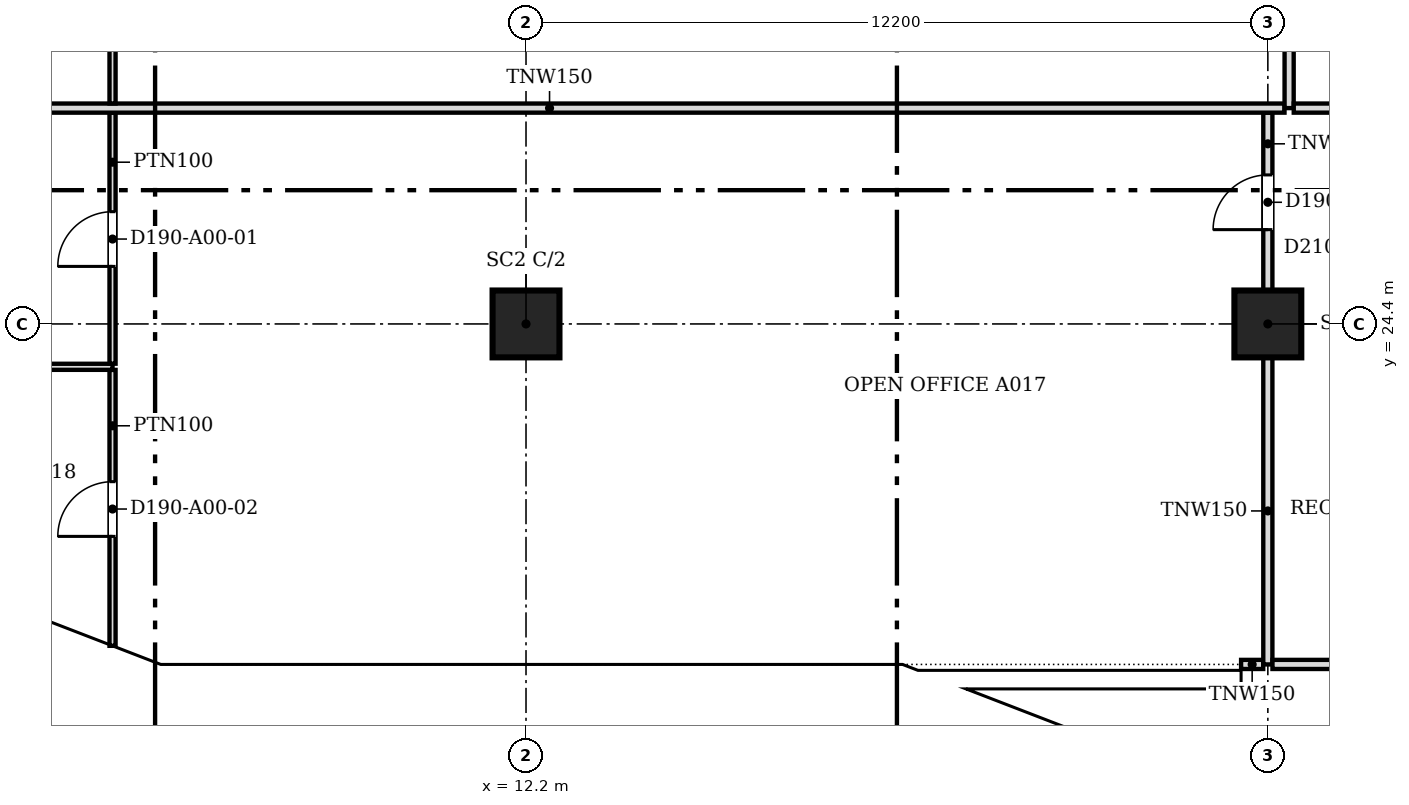
"""IFC4 building model, lengths in metres.
Left out: names, types, materials, properties, quantities, classifications, styles, units other than length and angle.
Written with IfcOpenShell. Run it as: python <this file> out.ifc"""

import sys

from ifc_helpers import new_model, si_unit, direction, frame, frame_2d, origin, origin_2d, place, context, subcontext, project, spatial, polyline, rectangle, outline, extrude, faceted_brep, source, transform, mapped, element, fill, save


model = new_model("IFC4")
c1 = context("Model", 3, precision=1e-05, world=origin(), true_north=direction((0.0, 1.0)))
c2 = subcontext(c1, "Body", "Model", "MODEL_VIEW")
j1 = project(units=[si_unit("LENGTHUNIT", "METRE"), si_unit("PLANEANGLEUNIT", "RADIAN")], contexts=[c1])
p1 = place(None, origin())
s1 = spatial("IfcSite", under=j1, at=p1, CompositionType="ELEMENT")
p2 = place(p1, origin())
s2 = spatial("IfcBuilding", under=s1, at=p2, CompositionType="ELEMENT")
p3 = place(p2, frame((0.0, 0.0, 16.8)))
s3 = spatial("IfcBuildingStorey", under=s2, at=p3, CompositionType="ELEMENT", Elevation=16.8)
for number, where, z_axis, x_axis in (
    (1, (12.2, 24.4, 0.0), (0.0, 0.0, 1.0), (1.0, 0.0, 0.0)),
    (2, (24.4, 24.4, 0.0), (0.0, 0.0, 1.0), (1.0, 0.0, 0.0)),
):
    element("IfcColumn", number, at=place(p3, frame(where, z_axis=z_axis, x_axis=x_axis)), inside=s3, PredefinedType="COLUMN", context=c2, shape_type="SweptSolid", body=[
        extrude(rectangle(XDim=1.1, YDim=1.1, at=origin_2d()), origin(), (0.0, 0.0, 1.0), 4.3),
    ])
m1 = source(origin(), c2, "Body", "Brep", [
    faceted_brep([(2.997, -0.25, 4.43), (2.95, -0.25, 4.5), (0.0, -0.25, 0.0), (2.997, -0.25, 0.0), (0.053, 0.25, 0.081), (2.904, 0.25, 4.429), (2.904, 0.25, 0.0), (0.053, 0.25, 0.0), (2.95, 0.0, 4.5), (0.0, 0.0, 0.0)], [[[0, 1, 2, 3]], [[4, 5, 6, 7]], [[8, 1, 0]], [[5, 4, 9, 2, 1, 8]], [[7, 6, 3, 2, 9]], [[7, 9, 4]], [[3, 6, 5, 8, 0]]]),
])
p4 = place(p3, frame((3.394, 19.612, 0.0), z_axis=(0.0, 0.0, 1.0), x_axis=(0.932990326376, -0.359901446078, 0.0)))
e3 = element("IfcWall", 3, at=p4, inside=s3, PredefinedType="SOLIDWALL", context=c2, shape_type="MappedRepresentation", body=[
    mapped(m1, transform((0.0, 0.0, 0.0), scale=1.0)),
])
m2 = source(origin(), c2, "Body", "SweptSolid", [
    extrude(outline(polyline([(2.75, 3.739), (0.463, 0.25), (2.75, 0.25), (2.75, 3.739)])), frame((0.0, 0.26, 0.0), z_axis=(0.0, -1.0, 0.0), x_axis=(1.0, 0.0, 0.0)), (0.0, 0.0, 1.0), 0.52),
])
p5 = place(p4, origin())
e4 = element("IfcOpeningElement", 4, at=p5, cuts=e3, PredefinedType="OPENING", context=c2, shape_type="MappedRepresentation", body=[
    mapped(m2, transform((0.0, 0.0, 0.0), scale=1.0)),
])
m3 = source(origin(), c2, "Body", "Brep", [
    faceted_brep([(3.05, -0.25, 0.0), (0.047, -0.25, 4.5), (0.0, -0.25, 4.429), (0.0, -0.25, 0.0), (0.093, 0.25, 4.43), (3.05, 0.25, 0.0), (0.093, 0.25, 0.0), (0.047, 0.0, 4.5)], [[[0, 1, 2, 3]], [[4, 5, 6]], [[5, 4, 7, 1, 0]], [[2, 1, 7]], [[6, 5, 0, 3]], [[6, 3, 2, 7, 4]]]),
])
p6 = place(p3, frame((6.1, 18.55, 0.0), z_axis=(0.0, 0.0, 1.0), x_axis=(1.0, 0.0, 0.0)))
e5 = element("IfcWall", 5, at=p6, inside=s3, PredefinedType="SOLIDWALL", context=c2, shape_type="MappedRepresentation", body=[
    mapped(m3, transform((0.0, 0.0, 0.0), scale=1.0)),
])
m4 = source(origin(), c2, "Body", "SweptSolid", [
    extrude(outline(polyline([(2.583, 0.25), (0.247, 3.75), (0.247, 0.25), (2.583, 0.25)])), frame((0.0, 0.26, 0.0), z_axis=(0.0, -1.0, 0.0), x_axis=(1.0, 0.0, 0.0)), (0.0, 0.0, 1.0), 0.52),
])
p7 = place(p6, origin())
e6 = element("IfcOpeningElement", 6, at=p7, cuts=e5, PredefinedType="OPENING", context=c2, shape_type="MappedRepresentation", body=[
    mapped(m4, transform((0.0, 0.0, 0.0), scale=1.0)),
])
m5 = source(origin(), c2, "Body", "SweptSolid", [
    extrude(outline(polyline([(6.1, 0.0), (3.05, 4.5), (0.0, 0.0), (6.1, 0.0)])), frame((0.0, 0.25, 0.0), z_axis=(0.0, -1.0, 0.0), x_axis=(1.0, 0.0, 0.0)), (0.0, 0.0, 1.0), 0.5),
])
p8 = place(p3, frame((9.15, 18.55, 0.0), z_axis=(0.0, 0.0, 1.0), x_axis=(1.0, 0.0, 0.0)))
e7 = element("IfcWall", 7, at=p8, inside=s3, PredefinedType="SOLIDWALL", context=c2, shape_type="MappedRepresentation", body=[
    mapped(m5, transform((0.0, 0.0, 0.0), scale=1.0)),
])
m6 = source(origin(), c2, "Body", "SweptSolid", [
    extrude(outline(polyline([(5.629, 0.25), (3.05, 4.054), (0.471, 0.25), (5.629, 0.25)])), frame((0.0, 0.26, 0.0), z_axis=(0.0, -1.0, 0.0), x_axis=(1.0, 0.0, 0.0)), (0.0, 0.0, 1.0), 0.52),
])
p9 = place(p8, origin())
e8 = element("IfcOpeningElement", 8, at=p9, cuts=e7, PredefinedType="OPENING", context=c2, shape_type="MappedRepresentation", body=[
    mapped(m6, transform((0.0, 0.0, 0.0), scale=1.0)),
])
m7 = source(origin(), c2, "Body", "Brep", [
    faceted_brep([(3.05, -0.25, 4.433), (0.0, -0.25, 0.0), (3.05, -0.25, 0.0), (0.0, 0.25, 0.0), (3.096, 0.25, 4.5), (3.143, 0.25, 4.433), (3.143, 0.25, 0.0), (3.096, -0.0, 4.5)], [[[0, 1, 2]], [[3, 4, 5, 6]], [[5, 4, 7]], [[4, 3, 1, 0, 7]], [[3, 6, 2, 1]], [[2, 6, 5, 7, 0]]]),
])
p10 = place(p3, frame((15.25, 18.55, 0.0), z_axis=(0.0, 0.0, 1.0), x_axis=(1.0, 0.0, 0.0)))
e9 = element("IfcWall", 9, at=p10, inside=s3, PredefinedType="SOLIDWALL", context=c2, shape_type="MappedRepresentation", body=[
    mapped(m7, transform((0.0, 0.0, 0.0), scale=1.0)),
])
m8 = source(origin(), c2, "Body", "SweptSolid", [
    extrude(outline(polyline([(2.896, 3.768), (0.476, 0.25), (2.896, 0.25), (2.896, 3.768)])), frame((0.0, 0.26, 0.0), z_axis=(0.0, -1.0, 0.0), x_axis=(1.0, 0.0, 0.0)), (0.0, 0.0, 1.0), 0.52),
])
p11 = place(p10, origin())
e10 = element("IfcOpeningElement", 10, at=p11, cuts=e9, PredefinedType="OPENING", context=c2, shape_type="MappedRepresentation", body=[
    mapped(m8, transform((0.0, 0.0, 0.0), scale=1.0)),
])
m9 = source(origin(), c2, "Body", "Brep", [
    faceted_brep([(3.143, -0.25, 0.075), (0.093, -0.25, 4.434), (0.093, -0.25, 0.0), (3.143, -0.25, 0.0), (0.0, 0.25, 4.432), (0.047, 0.25, 4.5), (3.196, 0.25, 0.0), (0.0, 0.25, 0.0), (0.047, 0.0, 4.5), (3.196, -0.0, 0.0)], [[[0, 1, 2, 3]], [[4, 5, 6, 7]], [[6, 5, 8, 1, 0, 9]], [[5, 4, 8]], [[7, 6, 9, 3, 2]], [[7, 2, 1, 8, 4]], [[3, 9, 0]]]),
])
p12 = place(p3, frame((18.303, 18.567, 0.0), z_axis=(0.0, 0.0, 1.0), x_axis=(0.932978940178, -0.359930961693, 0.0)))
e11 = element("IfcWall", 11, at=p12, inside=s3, PredefinedType="SOLIDWALL", context=c2, shape_type="MappedRepresentation", body=[
    mapped(m9, transform((0.0, 0.0, 0.0), scale=1.0)),
])
m10 = source(origin(), c2, "Body", "SweptSolid", [
    extrude(outline(polyline([(2.716, 0.25), (0.247, 3.778), (0.247, 0.25), (2.716, 0.25)])), frame((0.0, 0.26, 0.0), z_axis=(0.0, -1.0, 0.0), x_axis=(1.0, 0.0, 0.0)), (0.0, 0.0, 1.0), 0.52),
])
p13 = place(p12, origin())
e12 = element("IfcOpeningElement", 12, at=p13, cuts=e11, PredefinedType="OPENING", context=c2, shape_type="MappedRepresentation", body=[
    mapped(m10, transform((0.0, 0.0, 0.0), scale=1.0)),
])
p14 = place(p2, frame((0.0, 0.0, 21.3)))
s4 = spatial("IfcBuildingStorey", under=s2, at=p14, CompositionType="ELEMENT", Elevation=21.3)
m11 = source(origin(), c2, "Body", "Brep", [
    faceted_brep([(0.053, -0.25, 0.0), (3.003, -0.25, 4.5), (0.053, -0.25, 9.0), (0.0, -0.25, 8.919), (0.0, -0.25, 0.081), (0.106, 0.25, 8.919), (2.957, 0.25, 4.571), (2.957, 0.25, 4.429), (0.106, 0.25, 0.081), (3.003, 0.0, 4.5), (0.053, 0.0, 0.0), (0.053, 0.0, 9.0)], [[[0, 1, 2, 3, 4]], [[5, 6, 7, 8]], [[8, 7, 9, 1, 0, 10]], [[6, 5, 11, 2, 1, 9]], [[3, 2, 11]], [[10, 0, 4]], [[8, 10, 4, 3, 11, 5]], [[9, 7, 6]]]),
])
p15 = place(p14, frame((3.344, 19.631, -4.5), z_axis=(0.0, 0.0, 1.0), x_axis=(0.933007896601, -0.359855894603, 0.0)))
e13 = element("IfcWall", 13, at=p15, inside=s4, PredefinedType="SOLIDWALL", context=c2, shape_type="MappedRepresentation", body=[
    mapped(m11, transform((0.0, 0.0, 0.0), scale=1.0)),
])
m12 = source(origin(), c2, "Body", "SweptSolid", [
    extrude(outline(polyline([(0.253, 0.761), (2.705, 4.5), (0.253, 8.239), (0.253, 0.761)])), frame((0.0, 0.26, 0.0), z_axis=(0.0, -1.0, 0.0), x_axis=(1.0, 0.0, 0.0)), (0.0, 0.0, 1.0), 0.52),
])
p16 = place(p15, origin())
e14 = element("IfcOpeningElement", 14, at=p16, cuts=e13, PredefinedType="OPENING", context=c2, shape_type="MappedRepresentation", body=[
    mapped(m12, transform((0.0, 0.0, 0.0), scale=1.0)),
])
m13 = source(origin(), c2, "Body", "Brep", [
    faceted_brep([(3.003, -0.25, 0.0), (6.053, -0.25, 4.5), (3.003, -0.25, 9.0), (0.0, -0.25, 4.5), (0.047, 0.25, 4.57), (3.003, 0.25, 9.0), (6.053, 0.25, 4.5), (3.003, 0.25, 0.0), (0.047, 0.25, 4.43), (0.0, 0.0, 4.5)], [[[0, 1, 2, 3]], [[4, 5, 6, 7, 8]], [[7, 6, 1, 0]], [[6, 5, 2, 1]], [[5, 4, 9, 3, 2]], [[8, 7, 0, 3, 9]], [[8, 9, 4]]]),
])
p17 = place(p14, frame((6.146, 18.55, -4.5), z_axis=(0.0, 0.0, 1.0), x_axis=(1.0, 0.0, 0.0)))
e15 = element("IfcWall", 15, at=p17, inside=s4, PredefinedType="SOLIDWALL", context=c2, shape_type="MappedRepresentation", body=[
    mapped(m13, transform((0.0, 0.0, 0.0), scale=1.0)),
])
m14 = source(origin(), c2, "Body", "SweptSolid", [
    extrude(outline(polyline([(3.005, 0.448), (5.751, 4.5), (3.005, 8.552), (0.301, 4.5), (3.005, 0.448)])), frame((0.0, 0.26, 0.0), z_axis=(0.0, -1.0, 0.0), x_axis=(1.0, 0.0, 0.0)), (0.0, 0.0, 1.0), 0.52),
])
p18 = place(p17, origin())
e16 = element("IfcOpeningElement", 16, at=p18, cuts=e15, PredefinedType="OPENING", context=c2, shape_type="MappedRepresentation", body=[
    mapped(m14, transform((0.0, 0.0, 0.0), scale=1.0)),
])
m15 = source(origin(), c2, "Body", "Brep", [
    faceted_brep([(3.05, -0.25, 0.0), (6.1, -0.25, 4.432), (6.1, -0.25, 4.568), (3.05, -0.25, 9.0), (0.0, -0.25, 4.5), (0.0, 0.25, 4.5), (3.05, 0.25, 9.0), (6.146, 0.25, 4.5), (3.05, 0.25, 0.0), (6.146, -0.0, 4.5)], [[[0, 1, 2, 3, 4]], [[5, 6, 7, 8]], [[8, 7, 9, 1, 0]], [[7, 6, 3, 2, 9]], [[6, 5, 4, 3]], [[5, 8, 0, 4]], [[1, 9, 2]]]),
])
p19 = place(p14, frame((12.2, 18.55, -4.5), z_axis=(0.0, 0.0, 1.0), x_axis=(1.0, 0.0, 0.0)))
e17 = element("IfcWall", 17, at=p19, inside=s4, PredefinedType="SOLIDWALL", context=c2, shape_type="MappedRepresentation", body=[
    mapped(m15, transform((0.0, 0.0, 0.0), scale=1.0)),
])
m16 = source(origin(), c2, "Body", "SweptSolid", [
    extrude(outline(polyline([(3.052, 0.443), (5.843, 4.5), (3.052, 8.557), (0.302, 4.5), (3.052, 0.443)])), frame((0.0, 0.26, 0.0), z_axis=(0.0, -1.0, 0.0), x_axis=(1.0, 0.0, 0.0)), (0.0, 0.0, 1.0), 0.52),
])
p20 = place(p19, origin())
e18 = element("IfcOpeningElement", 18, at=p20, cuts=e17, PredefinedType="OPENING", context=c2, shape_type="MappedRepresentation", body=[
    mapped(m16, transform((0.0, 0.0, 0.0), scale=1.0)),
])
m17 = source(origin(), c2, "Body", "Brep", [
    faceted_brep([(3.096, -0.25, 8.925), (0.047, -0.25, 4.566), (0.047, -0.25, 4.434), (3.096, -0.25, 0.075), (0.0, 0.25, 4.5), (3.149, 0.25, 9.0), (3.202, 0.25, 8.925), (3.202, 0.25, 0.075), (3.149, 0.25, 0.0), (3.149, -0.0, 0.0), (3.149, -0.0, 9.0), (0.0, 0.0, 4.5)], [[[0, 1, 2, 3]], [[4, 5, 6, 7, 8]], [[8, 7, 9]], [[6, 5, 10]], [[5, 4, 11, 1, 0, 10]], [[4, 8, 9, 3, 2, 11]], [[11, 2, 1]], [[3, 9, 7, 6, 10, 0]]]),
])
p21 = place(p14, frame((18.346, 18.55, -4.5), z_axis=(0.0, 0.0, 1.0), x_axis=(0.932985567668, -0.359913782069, 0.0)))
e19 = element("IfcWall", 19, at=p21, inside=s4, PredefinedType="SOLIDWALL", context=c2, shape_type="MappedRepresentation", body=[
    mapped(m17, transform((0.0, 0.0, 0.0), scale=1.0)),
])
m18 = source(origin(), c2, "Body", "SweptSolid", [
    extrude(outline(polyline([(2.949, 8.278), (0.305, 4.5), (2.949, 0.722), (2.949, 8.278)])), frame((0.0, 0.26, 0.0), z_axis=(0.0, -1.0, 0.0), x_axis=(1.0, 0.0, 0.0)), (0.0, 0.0, 1.0), 0.52),
])
p22 = place(p21, origin())
e20 = element("IfcOpeningElement", 20, at=p22, cuts=e19, PredefinedType="OPENING", context=c2, shape_type="MappedRepresentation", body=[
    mapped(m18, transform((0.0, 0.0, 0.0), scale=1.0)),
])
p23 = place(p3, frame((23.96, 18.8, 0.0), z_axis=(0.0, 0.0, 1.0), x_axis=(1.0, 0.0, 0.0)))
e21 = element("IfcWall", 21, at=p23, inside=s3, PredefinedType="PARTITIONING", context=c2, shape_type="SweptSolid", body=[
    extrude(rectangle(XDim=0.364, YDim=0.15, at=frame_2d((0.182, 0.0))), origin(), (0.0, 0.0, 1.0), 3.415),
])
p24 = place(p3, frame((24.4, 18.8, 0.0), z_axis=(0.0, 0.0, 1.0), x_axis=(0.0, 1.0, 0.0)))
e22 = element("IfcWall", 22, at=p24, inside=s3, PredefinedType="PARTITIONING", context=c2, shape_type="SweptSolid", body=[
    extrude(rectangle(XDim=5.049, YDim=0.15, at=frame_2d((2.524, 0.0))), origin(), (0.0, 0.0, 1.0), 3.415),
])
p25 = place(p3, frame((24.476, 18.8, 0.0), z_axis=(0.0, 0.0, 1.0), x_axis=(1.0, 0.0, 0.0)))
e23 = element("IfcWall", 23, at=p25, inside=s3, PredefinedType="PARTITIONING", context=c2, shape_type="SweptSolid", body=[
    extrude(rectangle(XDim=3.548, YDim=0.15, at=frame_2d((1.774, 0.0))), origin(), (0.0, 0.0, 1.0), 3.415),
])
p26 = place(p3, frame((5.4, 19.106, 0.0), z_axis=(0.0, 0.0, 1.0), x_axis=(0.0, 1.0, 0.0)))
e24 = element("IfcWall", 24, at=p26, inside=s3, PredefinedType="PARTITIONING", context=c2, shape_type="SweptSolid", body=[
    extrude(rectangle(XDim=4.538, YDim=0.1, at=frame_2d((2.269, 0.0))), origin(), (0.0, 0.0, 1.0), 3.415),
])
m19 = source(origin(), c2, "Body", "SweptSolid", [
    extrude(rectangle(XDim=0.9, YDim=2.1, at=frame_2d((0.45, 1.05))), frame((0.0, 0.06, 0.0), z_axis=(0.0, -1.0, 0.0), x_axis=(1.0, 0.0, 0.0)), (0.0, 0.0, 1.0), 0.12),
])
p27 = place(p26, frame((1.8, 0.0, 0.0)))
e25 = element("IfcOpeningElement", 25, at=p27, cuts=e24, PredefinedType="OPENING", context=c2, shape_type="MappedRepresentation", body=[
    mapped(m19, transform((0.0, 0.0, 0.0), scale=1.0)),
])
p28 = place(p3, frame((0.808, 23.695, 0.0), z_axis=(0.0, 0.0, 1.0), x_axis=(1.0, 0.0, 0.0)))
e26 = element("IfcWall", 26, at=p28, inside=s3, PredefinedType="PARTITIONING", context=c2, shape_type="SweptSolid", body=[
    extrude(rectangle(XDim=4.592, YDim=0.1, at=frame_2d((2.296, 0.0))), origin(), (0.0, 0.0, 1.0), 3.415),
])
p29 = place(p3, frame((5.4, 23.746, 0.0), z_axis=(0.0, 0.0, 1.0), x_axis=(0.0, 1.0, 0.0)))
e27 = element("IfcWall", 27, at=p29, inside=s3, PredefinedType="PARTITIONING", context=c2, shape_type="SweptSolid", body=[
    extrude(rectangle(XDim=4.128, YDim=0.1, at=frame_2d((2.064, 0.0))), origin(), (0.0, 0.0, 1.0), 3.415),
])
p30 = place(p29, frame((1.6, 0.0, 0.0)))
e28 = element("IfcOpeningElement", 28, at=p30, cuts=e27, PredefinedType="OPENING", context=c2, shape_type="MappedRepresentation", body=[
    mapped(m19, transform((0.0, 0.0, 0.0), scale=1.0)),
])
p31 = place(p3, frame((24.4, 24.951, 0.0), z_axis=(0.0, 0.0, 1.0), x_axis=(0.0, 1.0, 0.0)))
e29 = element("IfcWall", 29, at=p31, inside=s3, PredefinedType="PARTITIONING", context=c2, shape_type="SweptSolid", body=[
    extrude(rectangle(XDim=2.923, YDim=0.15, at=frame_2d((1.461, 0.0))), origin(), (0.0, 0.0, 1.0), 3.415),
])
m20 = source(origin(), c2, "Body", "SweptSolid", [
    extrude(rectangle(XDim=0.9, YDim=2.1, at=frame_2d((0.45, 1.05))), frame((0.0, 0.085, 0.0), z_axis=(0.0, -1.0, 0.0), x_axis=(1.0, 0.0, 0.0)), (0.0, 0.0, 1.0), 0.17),
])
p32 = place(p31, frame((1.0, 0.0, 0.0)))
e30 = element("IfcOpeningElement", 30, at=p32, cuts=e29, PredefinedType="OPENING", context=c2, shape_type="MappedRepresentation", body=[
    mapped(m20, transform((0.0, 0.0, 0.0), scale=1.0)),
])
p33 = place(p3, frame((0.5, 27.95, 0.0), z_axis=(0.0, 0.0, 1.0), x_axis=(1.0, 0.0, 0.0)))
e31 = element("IfcWall", 31, at=p33, inside=s3, PredefinedType="PARTITIONING", context=c2, shape_type="SweptSolid", body=[
    extrude(rectangle(XDim=24.174, YDim=0.15, at=frame_2d((12.087, 0.0))), origin(), (0.0, 0.0, 1.0), 3.415),
])
p34 = place(p3, frame((24.75, 27.95, 0.0), z_axis=(0.0, 0.0, 1.0), x_axis=(0.0, 1.0, 0.0)))
e32 = element("IfcWall", 32, at=p34, inside=s3, PredefinedType="PARTITIONING", context=c2, shape_type="SweptSolid", body=[
    extrude(rectangle(XDim=6.1, YDim=0.15, at=frame_2d((3.05, 0.0))), origin(), (0.0, 0.0, 1.0), 3.415),
])
p35 = place(p34, frame((2.6, 0.0, 0.0)))
e33 = element("IfcOpeningElement", 33, at=p35, cuts=e32, PredefinedType="OPENING", context=c2, shape_type="MappedRepresentation", body=[
    mapped(m20, transform((0.0, 0.0, 0.0), scale=1.0)),
])
p36 = place(p3, frame((24.826, 27.95, 0.0), z_axis=(0.0, 0.0, 1.0), x_axis=(1.0, 0.0, 0.0)))
e34 = element("IfcWall", 34, at=p36, inside=s3, PredefinedType="PARTITIONING", context=c2, shape_type="SweptSolid", body=[
    extrude(rectangle(XDim=3.198, YDim=0.15, at=frame_2d((1.599, 0.0))), origin(), (0.0, 0.0, 1.0), 3.415),
])
p37 = place(p3, frame((5.4, 28.026, 0.0), z_axis=(0.0, 0.0, 1.0), x_axis=(0.0, 1.0, 0.0)))
e35 = element("IfcWall", 35, at=p37, inside=s3, PredefinedType="PARTITIONING", context=c2, shape_type="SweptSolid", body=[
    extrude(rectangle(XDim=5.948, YDim=0.1, at=frame_2d((2.974, 0.0))), origin(), (0.0, 0.0, 1.0), 3.415),
])
p38 = place(p37, frame((2.5, 0.0, 0.0)))
e36 = element("IfcOpeningElement", 36, at=p38, cuts=e35, PredefinedType="OPENING", context=c2, shape_type="MappedRepresentation", body=[
    mapped(m19, transform((0.0, 0.0, 0.0), scale=1.0)),
])
m21 = source(origin(), c2, "Body", "SweptSolid", [
    extrude(rectangle(XDim=0.9, YDim=2.1, at=frame_2d((0.45, 1.05))), frame((0.0, 0.025, 0.0), z_axis=(0.0, -1.0, 0.0), x_axis=(1.0, 0.0, 0.0)), (0.0, 0.0, 1.0), 0.05),
])
p39 = place(p30, origin())
e37 = element("IfcDoor", 37, at=p39, inside=s3, OperationType="SINGLE_SWING_LEFT", PredefinedType="DOOR", context=c2, shape_type="MappedRepresentation", body=[
    mapped(m21, transform((0.0, 0.0, 0.0), scale=1.0)),
])
fill(e28, e37)
p40 = place(p27, origin())
e38 = element("IfcDoor", 38, at=p40, inside=s3, OperationType="SINGLE_SWING_LEFT", PredefinedType="DOOR", context=c2, shape_type="MappedRepresentation", body=[
    mapped(m21, transform((0.0, 0.0, 0.0), scale=1.0)),
])
fill(e25, e38)
p41 = place(p32, origin())
e39 = element("IfcDoor", 39, at=p41, inside=s3, OperationType="SINGLE_SWING_LEFT", PredefinedType="DOOR", context=c2, shape_type="MappedRepresentation", body=[
    mapped(m21, transform((0.0, 0.0, 0.0), scale=1.0)),
])
fill(e30, e39)
save(model, sys.argv[1])
